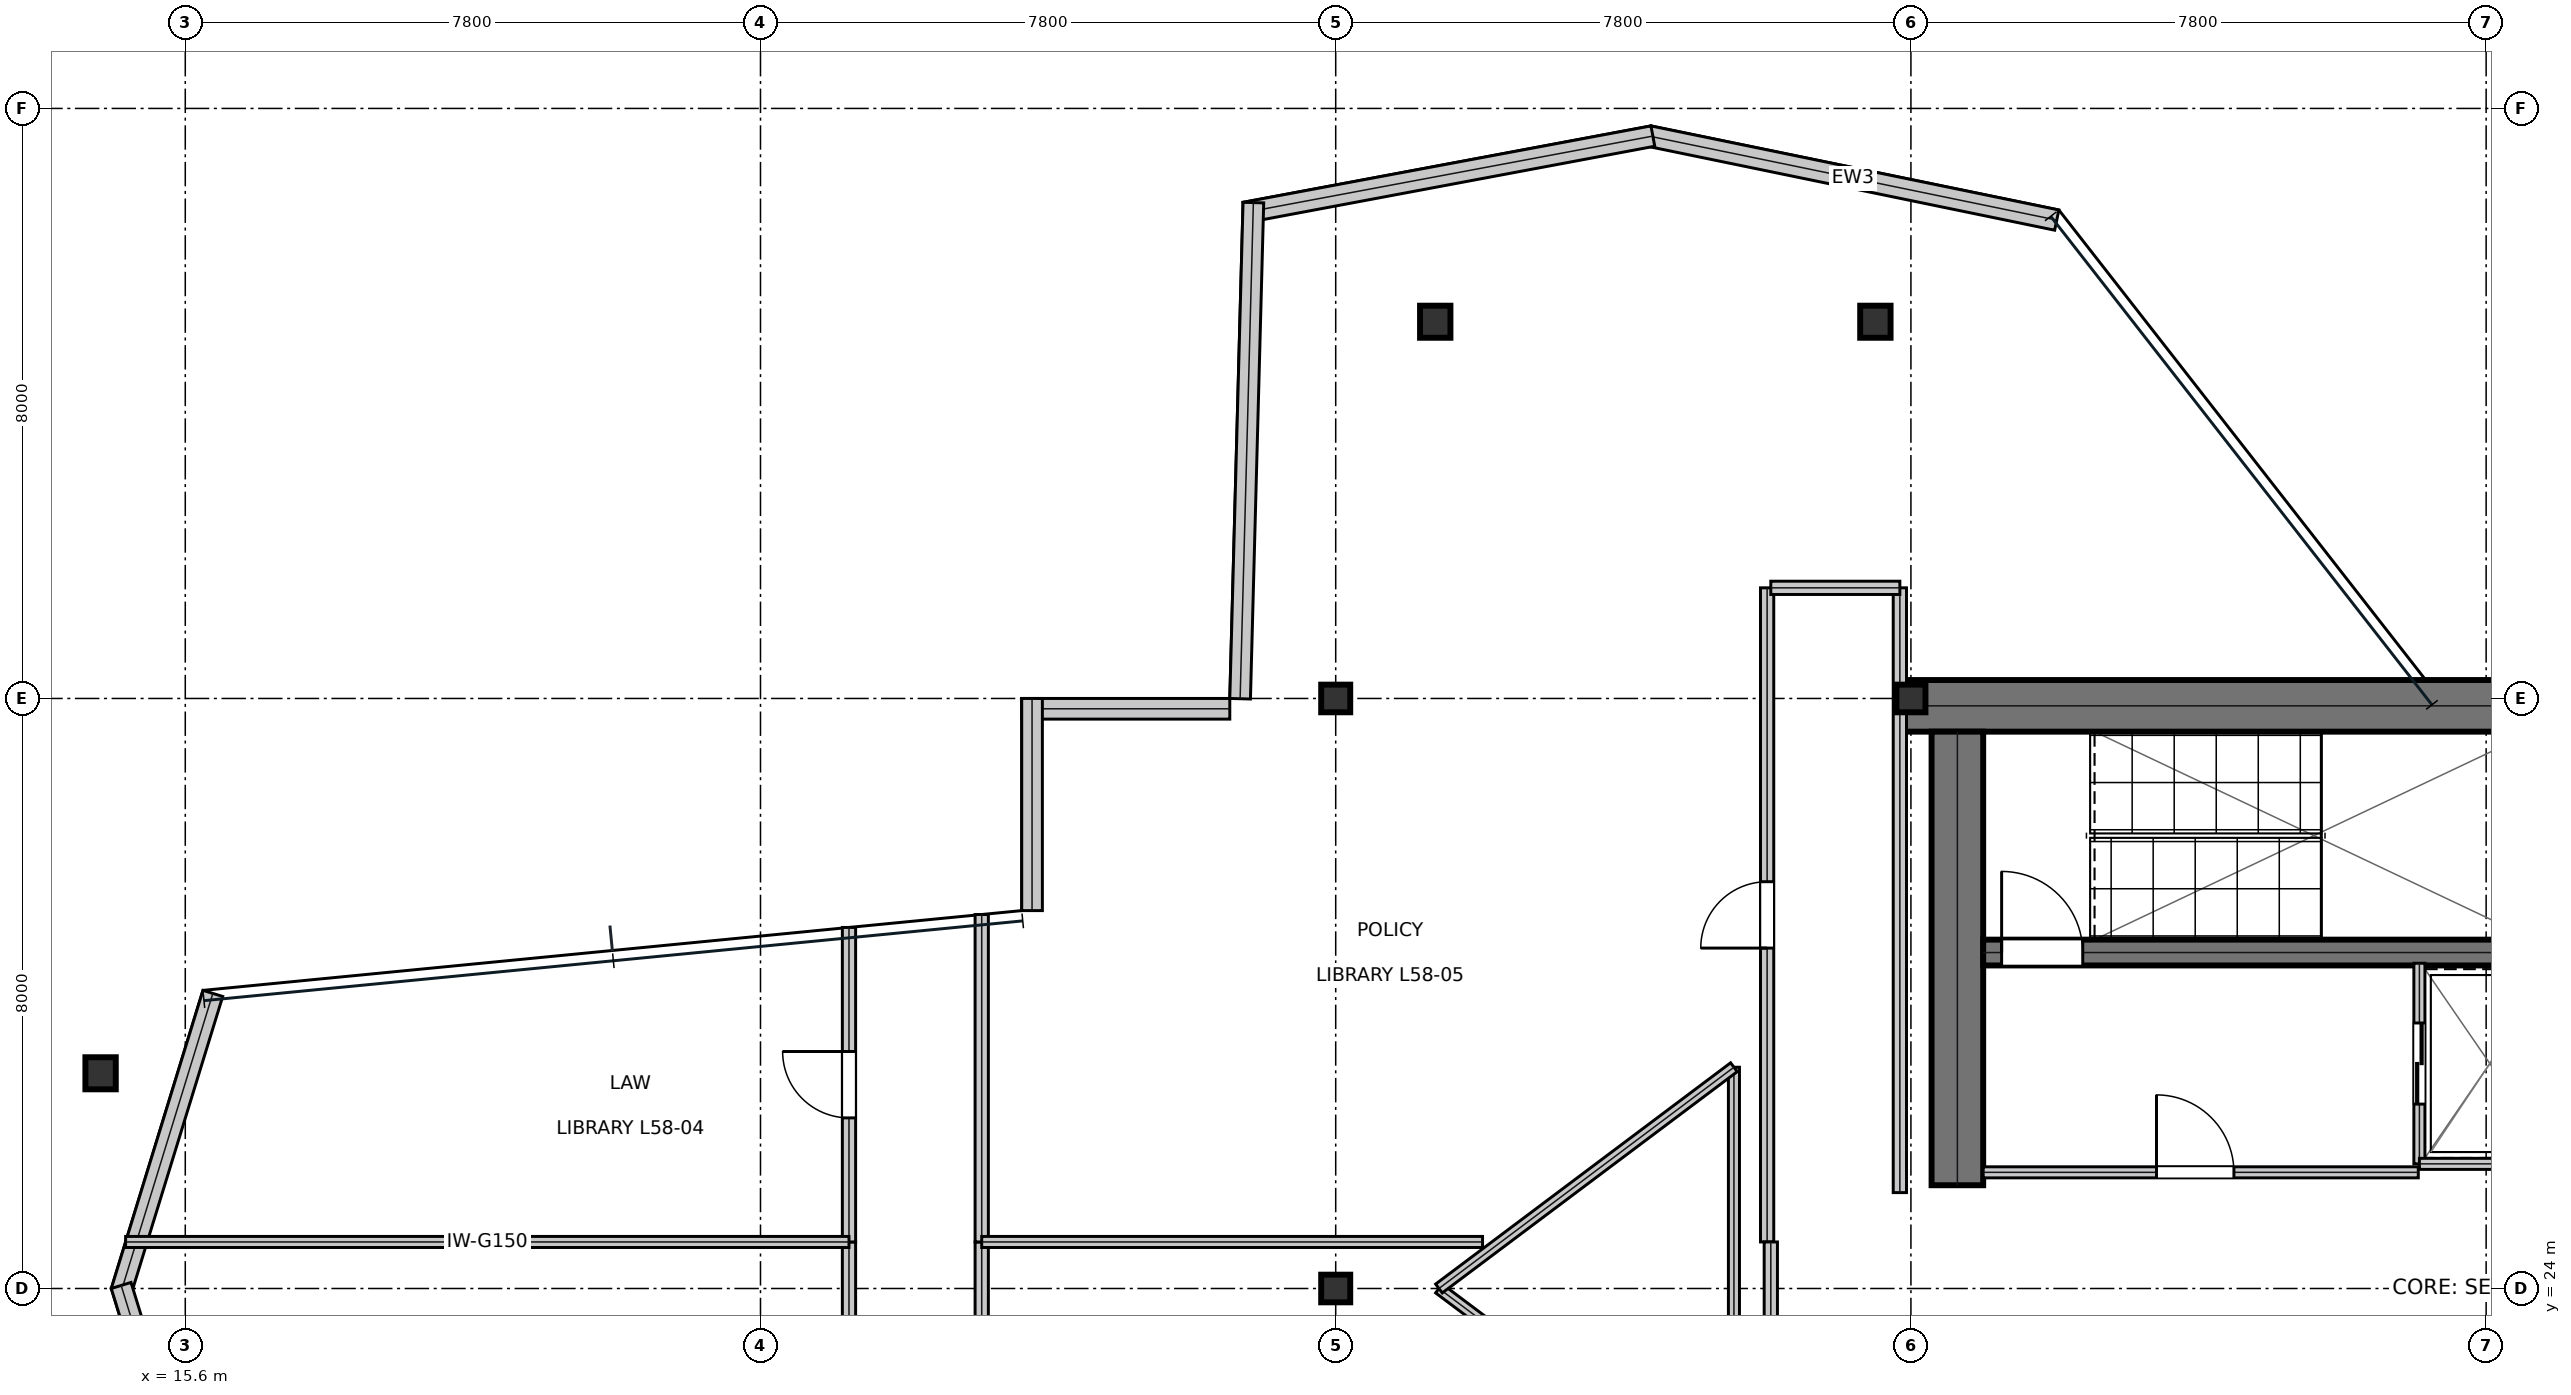
"""IFC4 building model, lengths in metres.
Left out: names, types, materials, properties, quantities, classifications, styles, units other than length and angle.
Written with IfcOpenShell. Run it as: python <this file> out.ifc"""

import sys

from ifc_helpers import new_model, si_unit, direction, frame, frame_2d, origin, origin_2d, place, context, subcontext, project, spatial, rectangle, i_section, extrude, element, fill, save


model = new_model("IFC4")
c1 = context("Model", 3, precision=1e-05, world=origin(), true_north=direction((0.0, 1.0)))
c2 = subcontext(c1, "Body", "Model", "MODEL_VIEW")
j1 = project(units=[si_unit("LENGTHUNIT", "METRE"), si_unit("PLANEANGLEUNIT", "RADIAN")], contexts=[c1])
p1 = place(None, origin())
s1 = spatial("IfcSite", under=j1, at=p1, CompositionType="ELEMENT")
p2 = place(p1, origin())
s2 = spatial("IfcBuilding", under=s1, at=p2, CompositionType="ELEMENT")
p3 = place(p2, frame((0.0, 0.0, 248.55)))
s3 = spatial("IfcBuildingStorey", under=s2, at=p3, CompositionType="ELEMENT", Elevation=248.55)
p4 = place(p3, frame((38.8, 31.9, 0.0), z_axis=(0.0, 0.0, 1.0), x_axis=(1.0, 0.0, 0.0)))
e1 = element("IfcWall", 1, at=p4, inside=s3, PredefinedType="SHEAR", context=c2, shape_type="SweptSolid", body=[
    extrude(rectangle(XDim=16.0, YDim=0.7, at=frame_2d((8.0, 0.0))), origin(), (0.0, 0.0, 1.0), 3.79),
])
p5 = place(p3, frame((39.63, 25.4, 0.0), z_axis=(0.0, 0.0, 1.0), x_axis=(0.0, 1.0, 0.0)))
e2 = element("IfcWall", 2, at=p5, inside=s3, PredefinedType="SHEAR", context=c2, shape_type="SweptSolid", body=[
    extrude(rectangle(XDim=6.15, YDim=0.7, at=frame_2d((3.075, 0.0))), origin(), (0.0, 0.0, 1.0), 3.79),
])
p6 = place(p3, frame((39.98, 28.555, 0.0), z_axis=(0.0, 0.0, 1.0), x_axis=(1.0, 0.0, 0.0)))
e3 = element("IfcWall", 3, at=p6, inside=s3, PredefinedType="SHEAR", context=c2, shape_type="SweptSolid", body=[
    extrude(rectangle(XDim=7.71, YDim=0.35, at=frame_2d((3.855, 0.0))), origin(), (0.0, 0.0, 1.0), 3.79),
])
p7 = place(p6, frame((0.25, 0.0, 0.0)))
e4 = element("IfcOpeningElement", 4, at=p7, cuts=e3, PredefinedType="OPENING", context=c2, shape_type="SweptSolid", body=[
    extrude(rectangle(XDim=1.1, YDim=2.15, at=frame_2d((0.55, 1.075))), frame((0.0, 0.185, 0.0), z_axis=(0.0, -1.0, 0.0), x_axis=(1.0, 0.0, 0.0)), (0.0, 0.0, 1.0), 0.37),
])
for number, where, z_axis, x_axis in (
    (5, (31.2, 24.0, 0.0), (0.0, 0.0, 1.0), (1.0, 0.0, 0.0)),
    (6, (31.2, 32.0, 0.0), (0.0, 0.0, 1.0), (1.0, 0.0, 0.0)),
    (7, (39.0, 32.0, 0.0), (0.0, 0.0, 1.0), (1.0, 0.0, 0.0)),
):
    element("IfcColumn", number, at=place(p3, frame(where, z_axis=z_axis, x_axis=x_axis)), inside=s3, PredefinedType="COLUMN", context=c2, shape_type="SweptSolid", body=[
        extrude(i_section(OverallWidth=0.394, OverallDepth=0.375, WebThickness=0.017, FlangeThickness=0.028, at=origin_2d()), origin(), (0.0, 0.0, 1.0), 4.044),
    ])
p8 = place(p3, frame((14.452, 26.918, 0.016), z_axis=(0.044614433031, -0.003217095171, 0.998999100432), x_axis=(0.071922099832, 0.997410252382, 0.0)))
e8 = element("IfcColumn", 8, at=p8, inside=s3, PredefinedType="COLUMN", context=c2, shape_type="SweptSolid", body=[
    extrude(i_section(OverallWidth=0.412, OverallDepth=0.435, WebThickness=0.036, FlangeThickness=0.058, at=origin_2d()), origin(), (0.0, 0.0, 1.0), 4.022),
])
p9 = place(p3, frame((32.55, 37.108, 0.016), z_axis=(0.00905127699, -0.019378237313, 0.999771252989), x_axis=(0.90603796466, 0.423196416095, 0.0)))
e9 = element("IfcColumn", 9, at=p9, inside=s3, PredefinedType="COLUMN", context=c2, shape_type="SweptSolid", body=[
    extrude(i_section(OverallWidth=0.412, OverallDepth=0.435, WebThickness=0.036, FlangeThickness=0.058, at=origin_2d()), origin(), (0.0, 0.0, 1.0), 4.019),
])
p10 = place(p3, frame((38.518, 37.108, 0.016), z_axis=(-0.003280445302, -0.019378926877, 0.999806829278), x_axis=(0.985973061302, -0.166904530753, 0.0)))
e10 = element("IfcColumn", 10, at=p10, inside=s3, PredefinedType="COLUMN", context=c2, shape_type="SweptSolid", body=[
    extrude(i_section(OverallWidth=0.412, OverallDepth=0.435, WebThickness=0.036, FlangeThickness=0.058, at=origin_2d()), origin(), (0.0, 0.0, 1.0), 4.019),
])
p11 = place(p3, frame((40.978, 38.486, 0.0), z_axis=(0.0, 0.0, 1.0), x_axis=(-0.979426896637, 0.201799291733, 0.0)))
e11 = element("IfcWall", 11, at=p11, inside=s3, PredefinedType="STANDARD", context=c2, shape_type="SweptSolid", body=[
    extrude(rectangle(XDim=5.647, YDim=0.28, at=frame_2d((2.824, 0.0))), origin(), (0.0, 0.0, 1.0), 3.79),
])
p12 = place(p3, frame((35.5, 39.625, 0.0), z_axis=(0.0, 0.0, 1.0), x_axis=(-0.982902134609, -0.184128742409, 0.0)))
e12 = element("IfcWall", 12, at=p12, inside=s3, PredefinedType="STANDARD", context=c2, shape_type="SweptSolid", body=[
    extrude(rectangle(XDim=5.627, YDim=0.28, at=frame_2d((2.813, 0.0))), origin(), (0.0, 0.0, 1.0), 3.79),
])
p13 = place(p3, frame((30.083, 38.723, 0.0), z_axis=(0.0, 0.0, 1.0), x_axis=(-0.026702629768, -0.999643421208, 0.0)))
e13 = element("IfcWall", 13, at=p13, inside=s3, PredefinedType="STANDARD", context=c2, shape_type="SweptSolid", body=[
    extrude(rectangle(XDim=6.729, YDim=0.28, at=frame_2d((3.365, 0.0))), origin(), (0.0, 0.0, 1.0), 3.79),
])
p14 = place(p3, frame((29.764, 31.86, 0.0), z_axis=(0.0, 0.0, 1.0), x_axis=(-1.0, 0.0, 0.0)))
e14 = element("IfcWall", 14, at=p14, inside=s3, PredefinedType="STANDARD", context=c2, shape_type="SweptSolid", body=[
    extrude(rectangle(XDim=2.822, YDim=0.28, at=frame_2d((1.411, 0.0))), origin(), (0.0, 0.0, 1.0), 3.79),
])
p15 = place(p3, frame((27.083, 32.0, 0.0), z_axis=(0.0, 0.0, 1.0), x_axis=(0.0, -1.0, 0.0)))
e15 = element("IfcWall", 15, at=p15, inside=s3, PredefinedType="STANDARD", context=c2, shape_type="SweptSolid", body=[
    extrude(rectangle(XDim=2.876, YDim=0.28, at=frame_2d((1.438, 0.0))), origin(), (0.0, 0.0, 1.0), 3.319),
])
for number, where, z_axis, x_axis in (
    (16, (15.974, 28.001, 0.0), (0.0, 0.0, 1.0), (-0.294, -0.956, 0.0)),
    (17, (14.731, 24.041, 0.0), (0.0, 0.0, 1.0), (0.294, -0.956, 0.0)),
):
    element("IfcWall", number, at=place(p3, frame(where, z_axis=z_axis, x_axis=x_axis)), inside=s3, PredefinedType="STANDARD", context=c2, shape_type="SweptSolid", body=[
        extrude(rectangle(XDim=4.229, YDim=0.28, at=frame_2d((2.114, 0.0))), origin(), (0.0, 0.0, 1.0), 3.241),
    ])
p16 = place(p3, frame((39.98, 25.575, 0.0), z_axis=(0.0, 0.0, 1.0), x_axis=(1.0, 0.0, 0.0)))
e18 = element("IfcWall", 18, at=p16, inside=s3, PredefinedType="PARTITIONING", context=c2, shape_type="SweptSolid", body=[
    extrude(rectangle(XDim=5.9, YDim=0.15, at=frame_2d((2.95, 0.0))), origin(), (0.0, 0.0, 1.0), 3.79),
])
p17 = place(p16, frame((2.35, 0.0, 0.0)))
e19 = element("IfcOpeningElement", 19, at=p17, cuts=e18, PredefinedType="OPENING", context=c2, shape_type="SweptSolid", body=[
    extrude(rectangle(XDim=1.05, YDim=2.15, at=frame_2d((0.525, 1.075))), frame((0.0, 0.085, 0.0), z_axis=(0.0, -1.0, 0.0), x_axis=(1.0, 0.0, 0.0)), (0.0, 0.0, 1.0), 0.17),
])
p18 = place(p3, frame((45.895, 25.69, 0.0), z_axis=(0.0, 0.0, 1.0), x_axis=(0.0, 1.0, 0.0)))
e20 = element("IfcWall", 20, at=p18, inside=s3, PredefinedType="PARTITIONING", context=c2, shape_type="SweptSolid", body=[
    extrude(rectangle(XDim=2.72, YDim=0.15, at=frame_2d((1.36, 0.0))), origin(), (0.0, 0.0, 1.0), 3.79),
])
p19 = place(p18, frame((0.81, 0.0, 0.0)))
e21 = element("IfcOpeningElement", 21, at=p19, cuts=e20, PredefinedType="OPENING", context=c2, shape_type="SweptSolid", body=[
    extrude(rectangle(XDim=1.1, YDim=2.15, at=frame_2d((0.55, 1.075))), frame((0.0, 0.085, 0.0), z_axis=(0.0, -1.0, 0.0), x_axis=(1.0, 0.0, 0.0)), (0.0, 0.0, 1.0), 0.17),
])
p20 = place(p3, frame((45.895, 25.69, 0.0), z_axis=(0.0, 0.0, 1.0), x_axis=(1.0, 0.0, 0.0)))
e22 = element("IfcWall", 22, at=p20, inside=s3, PredefinedType="PARTITIONING", context=c2, shape_type="SweptSolid", body=[
    extrude(rectangle(XDim=1.915, YDim=0.15, at=frame_2d((0.958, 0.0))), origin(), (0.0, 0.0, 1.0), 3.79),
])
p21 = place(p3, frame((24.6, 19.104, 0.0), z_axis=(0.0, 0.0, 1.0), x_axis=(0.0, 1.0, 0.0)))
e23 = element("IfcWall", 23, at=p21, inside=s3, PredefinedType="SOLIDWALL", context=c2, shape_type="SweptSolid", body=[
    extrude(rectangle(XDim=5.527, YDim=0.18, at=frame_2d((2.763, 0.0))), origin(), (0.0, 0.0, 1.0), 3.241),
])
p22 = place(p21, frame((2.313, 0.0, 0.0)))
e24 = element("IfcOpeningElement", 24, at=p22, cuts=e23, PredefinedType="OPENING", context=c2, shape_type="SweptSolid", body=[
    extrude(rectangle(XDim=0.9, YDim=2.15, at=frame_2d((0.45, 1.075))), frame((0.0, 0.1, 0.0), z_axis=(0.0, -1.0, 0.0), x_axis=(1.0, 0.0, 0.0)), (0.0, 0.0, 1.0), 0.2),
])
p23 = place(p3, frame((24.6, 24.631, 0.0), z_axis=(0.0, 0.0, 1.0), x_axis=(0.0, 1.0, 0.0)))
e25 = element("IfcWall", 25, at=p23, inside=s3, PredefinedType="SOLIDWALL", context=c2, shape_type="SweptSolid", body=[
    extrude(rectangle(XDim=4.264, YDim=0.18, at=frame_2d((2.132, 0.0))), origin(), (0.0, 0.0, 1.0), 3.241),
])
p24 = place(p23, frame((1.682, 0.0, 0.0)))
e26 = element("IfcOpeningElement", 26, at=p24, cuts=e25, PredefinedType="OPENING", context=c2, shape_type="SweptSolid", body=[
    extrude(rectangle(XDim=0.9, YDim=2.15, at=frame_2d((0.45, 1.075))), frame((0.0, 0.1, 0.0), z_axis=(0.0, -1.0, 0.0), x_axis=(1.0, 0.0, 0.0)), (0.0, 0.0, 1.0), 0.2),
])
p25 = place(p3, frame((37.05, 24.631, 0.0), z_axis=(0.0, 0.0, 1.0), x_axis=(0.0, 1.0, 0.0)))
e27 = element("IfcWall", 27, at=p25, inside=s3, PredefinedType="SOLIDWALL", context=c2, shape_type="SweptSolid", body=[
    extrude(rectangle(XDim=8.869, YDim=0.18, at=frame_2d((4.435, 0.0))), origin(), (0.0, 0.0, 1.0), 3.241),
])
p26 = place(p25, frame((3.985, 0.0, 0.0)))
e28 = element("IfcOpeningElement", 28, at=p26, cuts=e27, PredefinedType="OPENING", context=c2, shape_type="SweptSolid", body=[
    extrude(rectangle(XDim=0.9, YDim=2.15, at=frame_2d((0.45, 1.075))), frame((0.0, 0.1, 0.0), z_axis=(0.0, -1.0, 0.0), x_axis=(1.0, 0.0, 0.0)), (0.0, 0.0, 1.0), 0.2),
])
p27 = place(p3, frame((26.4, 20.6, 0.0), z_axis=(0.0, 0.0, 1.0), x_axis=(0.0, 1.0, 0.0)))
e29 = element("IfcWall", 29, at=p27, inside=s3, PredefinedType="SOLIDWALL", context=c2, shape_type="SweptSolid", body=[
    extrude(rectangle(XDim=4.031, YDim=0.18, at=frame_2d((2.016, 0.0))), origin(), (0.0, 0.0, 1.0), 3.241),
])
p28 = place(p3, frame((37.1, 20.6, 0.0), z_axis=(0.0, 0.0, 1.0), x_axis=(0.0, 1.0, 0.0)))
e30 = element("IfcWall", 30, at=p28, inside=s3, PredefinedType="SOLIDWALL", context=c2, shape_type="SweptSolid", body=[
    extrude(rectangle(XDim=4.031, YDim=0.18, at=frame_2d((2.016, 0.0))), origin(), (0.0, 0.0, 1.0), 3.79),
])
p29 = place(p3, frame((38.85, 25.3, 0.0), z_axis=(0.0, 0.0, 1.0), x_axis=(0.0, 1.0, 0.0)))
e31 = element("IfcWall", 31, at=p29, inside=s3, PredefinedType="SOLIDWALL", context=c2, shape_type="SweptSolid", body=[
    extrude(rectangle(XDim=8.2, YDim=0.18, at=frame_2d((4.1, 0.0))), origin(), (0.0, 0.0, 1.0), 3.241),
])
p30 = place(p3, frame((26.4, 24.631, 0.0), z_axis=(0.0, 0.0, 1.0), x_axis=(0.0, 1.0, 0.0)))
e32 = element("IfcWall", 32, at=p30, inside=s3, PredefinedType="SOLIDWALL", context=c2, shape_type="SweptSolid", body=[
    extrude(rectangle(XDim=4.44, YDim=0.18, at=frame_2d((2.22, 0.0))), origin(), (0.0, 0.0, 1.0), 3.241),
])
p31 = place(p3, frame((37.1, 33.5, 0.0), z_axis=(0.0, 0.0, 1.0), x_axis=(1.0, 0.0, 0.0)))
e33 = element("IfcWall", 33, at=p31, inside=s3, PredefinedType="SOLIDWALL", context=c2, shape_type="SweptSolid", body=[
    extrude(rectangle(XDim=1.75, YDim=0.18, at=frame_2d((0.875, 0.0))), origin(), (0.0, 0.0, 1.0), 3.241),
])
p32 = place(p3, frame((14.791, 24.631, 0.0), z_axis=(0.0, 0.0, 1.0), x_axis=(1.0, 0.0, 0.0)))
e34 = element("IfcWall", 34, at=p32, inside=s3, PredefinedType="MOVABLE", context=c2, shape_type="SweptSolid", body=[
    extrude(rectangle(XDim=9.809, YDim=0.15, at=frame_2d((4.905, 0.0))), origin(), (0.0, 0.0, 1.0), 3.468),
])
p33 = place(p3, frame((26.4, 24.631, 0.0), z_axis=(0.0, 0.0, 1.0), x_axis=(1.0, 0.0, 0.0)))
e35 = element("IfcWall", 35, at=p33, inside=s3, PredefinedType="MOVABLE", context=c2, shape_type="SweptSolid", body=[
    extrude(rectangle(XDim=6.792, YDim=0.15, at=frame_2d((3.396, 0.0))), origin(), (0.0, 0.0, 1.0), 3.241),
])
p34 = place(p3, frame((32.6, 24.0, 0.0), z_axis=(0.0, 0.0, 1.0), x_axis=(0.8, -0.6, 0.0)))
e36 = element("IfcWall", 36, at=p34, inside=s3, PredefinedType="MOVABLE", context=c2, shape_type="SweptSolid", body=[
    extrude(rectangle(XDim=5.0, YDim=0.15, at=frame_2d((2.5, 0.0))), origin(), (0.0, 0.0, 1.0), 3.79),
])
p35 = place(p3, frame((36.6, 21.0, 0.0), z_axis=(0.0, 0.0, 1.0), x_axis=(0.0, 1.0, 0.0)))
e37 = element("IfcWall", 37, at=p35, inside=s3, PredefinedType="MOVABLE", context=c2, shape_type="SweptSolid", body=[
    extrude(rectangle(XDim=6.0, YDim=0.15, at=frame_2d((3.0, 0.0))), origin(), (0.0, 0.0, 1.0), 3.79),
])
p36 = place(p3, frame((36.6, 27.0, 0.0), z_axis=(0.0, 0.0, 1.0), x_axis=(-0.8, -0.6, 0.0)))
e38 = element("IfcWall", 38, at=p36, inside=s3, PredefinedType="MOVABLE", context=c2, shape_type="SweptSolid", body=[
    extrude(rectangle(XDim=5.0, YDim=0.15, at=frame_2d((2.5, 0.0))), origin(), (0.0, 0.0, 1.0), 3.79),
])
p37 = place(p17, origin())
e39 = element("IfcDoor", 39, at=p37, inside=s3, OperationType="SINGLE_SWING_LEFT", PredefinedType="DOOR", context=c2, shape_type="SweptSolid", body=[
    extrude(rectangle(XDim=1.05, YDim=2.15, at=frame_2d((0.525, 1.075))), frame((0.0, 0.025, 0.0), z_axis=(0.0, -1.0, 0.0), x_axis=(1.0, 0.0, 0.0)), (0.0, 0.0, 1.0), 0.05),
])
fill(e19, e39)
p38 = place(p19, frame((1.1, 0.0, 0.0), z_axis=(0.0, 0.0, 1.0), x_axis=(-1.0, 0.0, 0.0)))
e40 = element("IfcDoor", 40, at=p38, inside=s3, OperationType="DOUBLE_DOOR_SLIDING", PredefinedType="DOOR", context=c2, shape_type="SweptSolid", body=[
    extrude(rectangle(XDim=1.1, YDim=2.15, at=frame_2d((0.55, 1.075))), frame((0.0, 0.025, 0.0), z_axis=(0.0, -1.0, 0.0), x_axis=(1.0, 0.0, 0.0)), (0.0, 0.0, 1.0), 0.05),
])
fill(e21, e40)
p39 = place(p24, origin())
e41 = element("IfcDoor", 41, at=p39, inside=s3, OperationType="SINGLE_SWING_RIGHT", PredefinedType="DOOR", context=c2, shape_type="SweptSolid", body=[
    extrude(rectangle(XDim=0.9, YDim=2.15, at=frame_2d((0.45, 1.075))), frame((0.0, 0.025, 0.0), z_axis=(0.0, -1.0, 0.0), x_axis=(1.0, 0.0, 0.0)), (0.0, 0.0, 1.0), 0.05),
])
fill(e26, e41)
p40 = place(p26, origin())
e42 = element("IfcDoor", 42, at=p40, inside=s3, OperationType="SINGLE_SWING_LEFT", PredefinedType="DOOR", context=c2, shape_type="SweptSolid", body=[
    extrude(rectangle(XDim=0.9, YDim=2.15, at=frame_2d((0.45, 1.075))), frame((0.0, 0.025, 0.0), z_axis=(0.0, -1.0, 0.0), x_axis=(1.0, 0.0, 0.0)), (0.0, 0.0, 1.0), 0.05),
])
fill(e28, e42)
p41 = place(p7, origin())
e43 = element("IfcDoor", 43, at=p41, inside=s3, OperationType="SINGLE_SWING_LEFT", PredefinedType="DOOR", context=c2, shape_type="SweptSolid", body=[
    extrude(rectangle(XDim=1.1, YDim=2.15, at=frame_2d((0.55, 1.075))), frame((0.0, 0.025, 0.0), z_axis=(0.0, -1.0, 0.0), x_axis=(1.0, 0.0, 0.0)), (0.0, 0.0, 1.0), 0.05),
])
fill(e4, e43)
save(model, sys.argv[1])
